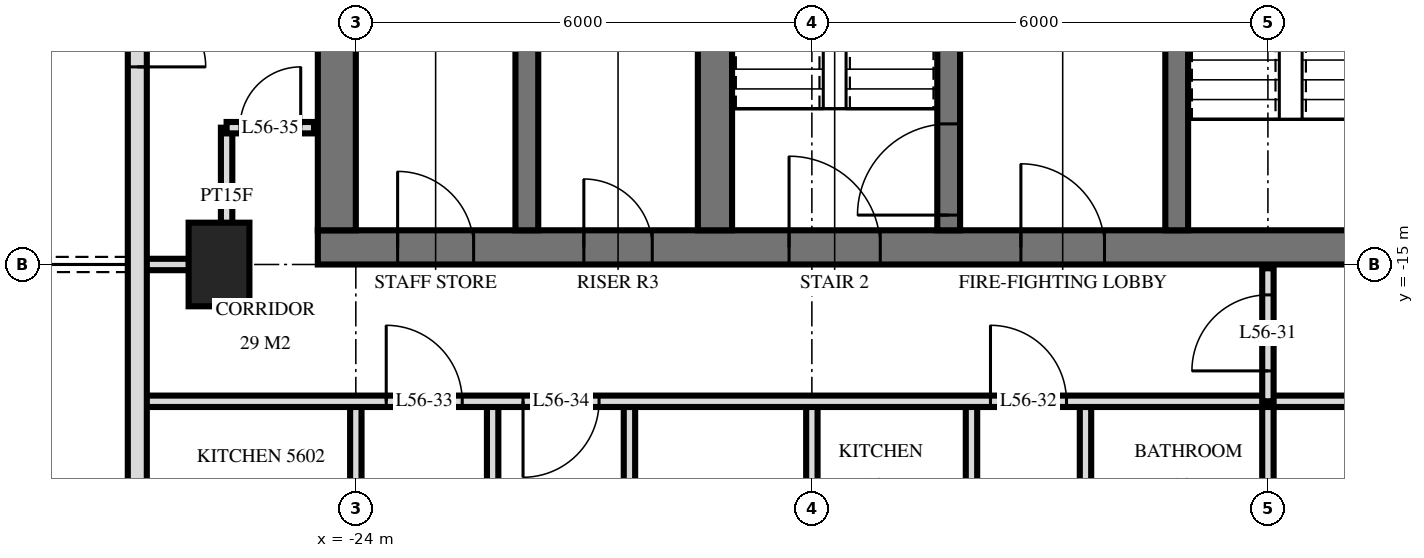
"""IFC4 building model, lengths in metres.
Left out: names, types, materials, properties, quantities, classifications, styles, units other than length and angle.
Written with IfcOpenShell. Run it as: python <this file> out.ifc"""

import sys

from ifc_helpers import new_model, si_unit, direction, frame, frame_2d, origin, origin_2d, place, context, subcontext, project, spatial, rectangle, extrude, element, fill, save


model = new_model("IFC4")
c1 = context("Model", 3, precision=1e-05, world=origin(), true_north=direction((0.0, 1.0)))
c2 = subcontext(c1, "Body", "Model", "MODEL_VIEW")
j1 = project(units=[si_unit("LENGTHUNIT", "METRE"), si_unit("PLANEANGLEUNIT", "RADIAN")], contexts=[c1])
p1 = place(None, origin())
s1 = spatial("IfcSite", under=j1, at=p1, CompositionType="ELEMENT")
p2 = place(p1, origin())
s2 = spatial("IfcBuilding", under=s1, at=p2, CompositionType="ELEMENT")
p3 = place(p2, frame((0.0, 0.0, 215.1)))
s3 = spatial("IfcBuildingStorey", under=s2, at=p3, CompositionType="ELEMENT", Elevation=215.1)
p4 = place(p3, frame((-25.8, -15.0, 0.0), z_axis=(0.0, 0.0, 1.0), x_axis=(0.0, 1.0, 0.0)))
e1 = element("IfcColumn", 1, at=p4, inside=s3, PredefinedType="COLUMN", context=c2, shape_type="SweptSolid", body=[
    extrude(rectangle(XDim=1.1, YDim=0.8, at=origin_2d()), origin(), (0.0, 0.0, 1.0), 3.5),
])
p5 = place(p3, frame((-24.5, -14.775, 0.0), z_axis=(0.0, 0.0, 1.0), x_axis=(1.0, 0.0, 0.0)))
e2 = element("IfcWall", 2, at=p5, inside=s3, PredefinedType="SHEAR", context=c2, shape_type="SweptSolid", body=[
    extrude(rectangle(XDim=14.5, YDim=0.45, at=frame_2d((7.25, 0.0))), origin(), (0.0, 0.0, 1.0), 3.5),
])
p6 = place(p5, frame((6.2, 0.0, 0.0)))
e3 = element("IfcOpeningElement", 3, at=p6, cuts=e2, PredefinedType="OPENING", context=c2, shape_type="SweptSolid", body=[
    extrude(rectangle(XDim=1.2, YDim=2.1, at=frame_2d((0.6, 1.05))), frame((0.0, 0.235, 0.0), z_axis=(0.0, -1.0, 0.0), x_axis=(1.0, 0.0, 0.0)), (0.0, 0.0, 1.0), 0.47),
])
p7 = place(p5, frame((9.25, 0.0, 0.0)))
e4 = element("IfcOpeningElement", 4, at=p7, cuts=e2, PredefinedType="OPENING", context=c2, shape_type="SweptSolid", body=[
    extrude(rectangle(XDim=1.1, YDim=2.1, at=frame_2d((0.55, 1.05))), frame((0.0, 0.235, 0.0), z_axis=(0.0, -1.0, 0.0), x_axis=(1.0, 0.0, 0.0)), (0.0, 0.0, 1.0), 0.47),
])
p8 = place(p5, frame((3.5, 0.0, 0.0)))
e5 = element("IfcOpeningElement", 5, at=p8, cuts=e2, PredefinedType="OPENING", context=c2, shape_type="SweptSolid", body=[
    extrude(rectangle(XDim=0.9, YDim=2.1, at=frame_2d((0.45, 1.05))), frame((0.0, 0.235, 0.0), z_axis=(0.0, -1.0, 0.0), x_axis=(1.0, 0.0, 0.0)), (0.0, 0.0, 1.0), 0.47),
])
p9 = place(p5, frame((1.05, 0.0, 0.0)))
e6 = element("IfcOpeningElement", 6, at=p9, cuts=e2, PredefinedType="OPENING", context=c2, shape_type="SweptSolid", body=[
    extrude(rectangle(XDim=1.0, YDim=2.1, at=frame_2d((0.5, 1.05))), frame((0.0, 0.235, 0.0), z_axis=(0.0, -1.0, 0.0), x_axis=(1.0, 0.0, 0.0)), (0.0, 0.0, 1.0), 0.47),
])
p10 = place(p3, frame((-24.25, -14.55, 0.0), z_axis=(0.0, 0.0, 1.0), x_axis=(0.0, 1.0, 0.0)))
e7 = element("IfcWall", 7, at=p10, inside=s3, PredefinedType="SHEAR", context=c2, shape_type="SweptSolid", body=[
    extrude(rectangle(XDim=14.1, YDim=0.5, at=frame_2d((7.05, 0.0))), origin(), (0.0, 0.0, 1.0), 3.5),
])
p11 = place(p3, frame((-13.2, -14.55, 0.0), z_axis=(0.0, 0.0, 1.0), x_axis=(0.0, 1.0, 0.0)))
e8 = element("IfcWall", 8, at=p11, inside=s3, PredefinedType="SHEAR", context=c2, shape_type="SweptSolid", body=[
    extrude(rectangle(XDim=5.4, YDim=0.3, at=frame_2d((2.7, 0.0))), origin(), (0.0, 0.0, 1.0), 3.5),
])
p12 = place(p11, frame((4.0, 0.0, 0.0)))
e9 = element("IfcOpeningElement", 9, at=p12, cuts=e8, PredefinedType="OPENING", context=c2, shape_type="SweptSolid", body=[
    extrude(rectangle(XDim=1.2, YDim=2.1, at=frame_2d((0.6, 1.05))), frame((0.0, 0.16, 0.0), z_axis=(0.0, -1.0, 0.0), x_axis=(1.0, 0.0, 0.0)), (0.0, 0.0, 1.0), 0.32),
])
p13 = place(p3, frame((-16.2, -14.55, 0.0), z_axis=(0.0, 0.0, 1.0), x_axis=(0.0, 1.0, 0.0)))
e10 = element("IfcWall", 10, at=p13, inside=s3, PredefinedType="SHEAR", context=c2, shape_type="SweptSolid", body=[
    extrude(rectangle(XDim=5.4, YDim=0.3, at=frame_2d((2.7, 0.0))), origin(), (0.0, 0.0, 1.0), 3.5),
])
p14 = place(p13, frame((0.2, 0.0, 0.0)))
e11 = element("IfcOpeningElement", 11, at=p14, cuts=e10, PredefinedType="OPENING", context=c2, shape_type="SweptSolid", body=[
    extrude(rectangle(XDim=1.2, YDim=2.1, at=frame_2d((0.6, 1.05))), frame((0.0, 0.16, 0.0), z_axis=(0.0, -1.0, 0.0), x_axis=(1.0, 0.0, 0.0)), (0.0, 0.0, 1.0), 0.32),
])
p15 = place(p3, frame((-19.275, -14.55, 0.0), z_axis=(0.0, 0.0, 1.0), x_axis=(0.0, 1.0, 0.0)))
e12 = element("IfcWall", 12, at=p15, inside=s3, PredefinedType="SHEAR", context=c2, shape_type="SweptSolid", body=[
    extrude(rectangle(XDim=5.4, YDim=0.45, at=frame_2d((2.7, 0.0))), origin(), (0.0, 0.0, 1.0), 3.5),
])
p16 = place(p3, frame((-21.75, -14.55, 0.0), z_axis=(0.0, 0.0, 1.0), x_axis=(0.0, 1.0, 0.0)))
e13 = element("IfcWall", 13, at=p16, inside=s3, PredefinedType="SHEAR", context=c2, shape_type="SweptSolid", body=[
    extrude(rectangle(XDim=5.4, YDim=0.3, at=frame_2d((2.7, 0.0))), origin(), (0.0, 0.0, 1.0), 3.5),
])
p17 = place(p3, frame((-26.875, -3.325, 0.0), z_axis=(0.0, 0.0, 1.0), x_axis=(0.0, -1.0, 0.0)))
e14 = element("IfcWall", 14, at=p17, inside=s3, PredefinedType="SOLIDWALL", context=c2, shape_type="SweptSolid", body=[
    extrude(rectangle(XDim=21.551, YDim=0.25, at=frame_2d((10.775, 0.0))), origin(), (0.0, 0.0, 1.0), 3.22),
])
p18 = place(p17, frame((7.275, 0.0, 0.0)))
e15 = element("IfcOpeningElement", 15, at=p18, cuts=e14, PredefinedType="OPENING", context=c2, shape_type="SweptSolid", body=[
    extrude(rectangle(XDim=1.8, YDim=2.4, at=frame_2d((0.9, 1.2))), frame((0.0, 0.135, 0.0), z_axis=(0.0, -1.0, 0.0), x_axis=(1.0, 0.0, 0.0)), (0.0, 0.0, 1.0), 0.27),
])
p19 = place(p17, frame((15.275, 0.0, 0.0)))
e16 = element("IfcOpeningElement", 16, at=p19, cuts=e14, PredefinedType="OPENING", context=c2, shape_type="SweptSolid", body=[
    extrude(rectangle(XDim=1.8, YDim=2.4, at=frame_2d((0.9, 1.2))), frame((0.0, 0.135, 0.0), z_axis=(0.0, -1.0, 0.0), x_axis=(1.0, 0.0, 0.0)), (0.0, 0.0, 1.0), 0.27),
])
p20 = place(p17, frame((18.875, 0.0, 0.0)))
e17 = element("IfcOpeningElement", 17, at=p20, cuts=e14, PredefinedType="OPENING", context=c2, shape_type="SweptSolid", body=[
    extrude(rectangle(XDim=1.8, YDim=2.4, at=frame_2d((0.9, 1.2))), frame((0.0, 0.135, 0.0), z_axis=(0.0, -1.0, 0.0), x_axis=(1.0, 0.0, 0.0)), (0.0, 0.0, 1.0), 0.27),
])
p21 = place(p3, frame((-12.0, -16.8, 0.0), z_axis=(0.0, 0.0, 1.0), x_axis=(0.0, 1.0, 0.0)))
e18 = element("IfcWall", 18, at=p21, inside=s3, PredefinedType="PARTITIONING", context=c2, shape_type="SweptSolid", body=[
    extrude(rectangle(XDim=1.75, YDim=0.15, at=frame_2d((0.875, 0.0))), origin(), (0.0, 0.0, 1.0), 3.22),
])
p22 = place(p21, frame((0.4, 0.0, 0.0)))
e19 = element("IfcOpeningElement", 19, at=p22, cuts=e18, PredefinedType="OPENING", context=c2, shape_type="SweptSolid", body=[
    extrude(rectangle(XDim=1.0, YDim=2.1, at=frame_2d((0.5, 1.05))), frame((0.0, 0.085, 0.0), z_axis=(0.0, -1.0, 0.0), x_axis=(1.0, 0.0, 0.0)), (0.0, 0.0, 1.0), 0.17),
])
p23 = place(p3, frame((-12.0, -29.22, 0.0), z_axis=(0.0, 0.0, 1.0), x_axis=(0.0, 1.0, 0.0)))
e20 = element("IfcWall", 20, at=p23, inside=s3, PredefinedType="PARTITIONING", context=c2, shape_type="SweptSolid", body=[
    extrude(rectangle(XDim=12.42, YDim=0.15, at=frame_2d((6.21, 0.0))), origin(), (0.0, 0.0, 1.0), 3.22),
])
p24 = place(p3, frame((-14.4, -21.0, 0.0), z_axis=(0.0, 0.0, 1.0), x_axis=(0.0, 1.0, 0.0)))
e21 = element("IfcWall", 21, at=p24, inside=s3, PredefinedType="PARTITIONING", context=c2, shape_type="SweptSolid", body=[
    extrude(rectangle(XDim=4.2, YDim=0.15, at=frame_2d((2.1, 0.0))), origin(), (0.0, 0.0, 1.0), 3.22),
])
p25 = place(p24, frame((1.6, 0.0, 0.0)))
e22 = element("IfcOpeningElement", 22, at=p25, cuts=e21, PredefinedType="OPENING", context=c2, shape_type="SweptSolid", body=[
    extrude(rectangle(XDim=1.0, YDim=2.1, at=frame_2d((0.5, 1.05))), frame((0.0, 0.085, 0.0), z_axis=(0.0, -1.0, 0.0), x_axis=(1.0, 0.0, 0.0)), (0.0, 0.0, 1.0), 0.17),
])
p26 = place(p3, frame((-15.9, -21.0, 0.0), z_axis=(0.0, 0.0, 1.0), x_axis=(0.0, 1.0, 0.0)))
e23 = element("IfcWall", 23, at=p26, inside=s3, PredefinedType="PARTITIONING", context=c2, shape_type="SweptSolid", body=[
    extrude(rectangle(XDim=4.2, YDim=0.15, at=frame_2d((2.1, 0.0))), origin(), (0.0, 0.0, 1.0), 3.22),
])
p27 = place(p26, frame((1.6, 0.0, 0.0)))
e24 = element("IfcOpeningElement", 24, at=p27, cuts=e23, PredefinedType="OPENING", context=c2, shape_type="SweptSolid", body=[
    extrude(rectangle(XDim=1.0, YDim=2.1, at=frame_2d((0.5, 1.05))), frame((0.0, 0.085, 0.0), z_axis=(0.0, -1.0, 0.0), x_axis=(1.0, 0.0, 0.0)), (0.0, 0.0, 1.0), 0.17),
])
p28 = place(p3, frame((-18.0, -29.22, 0.0), z_axis=(0.0, 0.0, 1.0), x_axis=(0.0, 1.0, 0.0)))
e25 = element("IfcWall", 25, at=p28, inside=s3, PredefinedType="PARTITIONING", context=c2, shape_type="SweptSolid", body=[
    extrude(rectangle(XDim=12.42, YDim=0.15, at=frame_2d((6.21, 0.0))), origin(), (0.0, 0.0, 1.0), 3.22),
])
for number, where, z_axis, x_axis in (
    (26, (-20.4, -21.0, 0.0), (0.0, 0.0, 1.0), (0.0, 1.0, 0.0)),
    (27, (-22.2, -21.0, 0.0), (0.0, 0.0, 1.0), (0.0, 1.0, 0.0)),
):
    element("IfcWall", number, at=place(p3, frame(where, z_axis=z_axis, x_axis=x_axis)), inside=s3, PredefinedType="PARTITIONING", context=c2, shape_type="SweptSolid", body=[
        extrude(rectangle(XDim=4.2, YDim=0.15, at=frame_2d((2.1, 0.0))), origin(), (0.0, 0.0, 1.0), 3.22),
    ])
p29 = place(p3, frame((-24.0, -21.0, 0.0), z_axis=(0.0, 0.0, 1.0), x_axis=(0.0, 1.0, 0.0)))
e28 = element("IfcWall", 28, at=p29, inside=s3, PredefinedType="PARTITIONING", context=c2, shape_type="SweptSolid", body=[
    extrude(rectangle(XDim=4.2, YDim=0.15, at=frame_2d((2.1, 0.0))), origin(), (0.0, 0.0, 1.0), 3.22),
])
p30 = place(p29, frame((1.58, 0.0, 0.0)))
e29 = element("IfcOpeningElement", 29, at=p30, cuts=e28, PredefinedType="OPENING", context=c2, shape_type="SweptSolid", body=[
    extrude(rectangle(XDim=1.0, YDim=2.1, at=frame_2d((0.5, 1.05))), frame((0.0, 0.085, 0.0), z_axis=(0.0, -1.0, 0.0), x_axis=(1.0, 0.0, 0.0)), (0.0, 0.0, 1.0), 0.17),
])
p31 = place(p3, frame((-25.7, -15.0, 0.0), z_axis=(0.0, 0.0, 1.0), x_axis=(0.0, 1.0, 0.0)))
e30 = element("IfcWall", 30, at=p31, inside=s3, PredefinedType="PARTITIONING", context=c2, shape_type="SweptSolid", body=[
    extrude(rectangle(XDim=1.8, YDim=0.15, at=frame_2d((0.9, 0.0))), origin(), (0.0, 0.0, 1.0), 3.22),
])
p32 = place(p3, frame((-26.82, -16.8, 0.0), z_axis=(0.0, 0.0, 1.0), x_axis=(1.0, 0.0, 0.0)))
e31 = element("IfcWall", 31, at=p32, inside=s3, PredefinedType="PARTITIONING", context=c2, shape_type="SweptSolid", body=[
    extrude(rectangle(XDim=53.64, YDim=0.15, at=frame_2d((26.82, 0.0))), origin(), (0.0, 0.0, 1.0), 3.22),
])
p33 = place(p32, frame((11.17, 0.0, 0.0)))
e32 = element("IfcOpeningElement", 32, at=p33, cuts=e31, PredefinedType="OPENING", context=c2, shape_type="SweptSolid", body=[
    extrude(rectangle(XDim=1.0, YDim=2.1, at=frame_2d((0.5, 1.05))), frame((0.0, 0.085, 0.0), z_axis=(0.0, -1.0, 0.0), x_axis=(1.0, 0.0, 0.0)), (0.0, 0.0, 1.0), 0.17),
])
p34 = place(p32, frame((3.22, 0.0, 0.0)))
e33 = element("IfcOpeningElement", 33, at=p34, cuts=e31, PredefinedType="OPENING", context=c2, shape_type="SweptSolid", body=[
    extrude(rectangle(XDim=1.0, YDim=2.1, at=frame_2d((0.5, 1.05))), frame((0.0, 0.085, 0.0), z_axis=(0.0, -1.0, 0.0), x_axis=(1.0, 0.0, 0.0)), (0.0, 0.0, 1.0), 0.17),
])
p35 = place(p32, frame((5.02, 0.0, 0.0)))
e34 = element("IfcOpeningElement", 34, at=p35, cuts=e31, PredefinedType="OPENING", context=c2, shape_type="SweptSolid", body=[
    extrude(rectangle(XDim=1.0, YDim=2.1, at=frame_2d((0.5, 1.05))), frame((0.0, 0.085, 0.0), z_axis=(0.0, -1.0, 0.0), x_axis=(1.0, 0.0, 0.0)), (0.0, 0.0, 1.0), 0.17),
])
p36 = place(p32, frame((47.72, 0.0, 0.0)))
e35 = element("IfcOpeningElement", 35, at=p36, cuts=e31, PredefinedType="OPENING", context=c2, shape_type="SweptSolid", body=[
    extrude(rectangle(XDim=1.0, YDim=2.1, at=frame_2d((0.5, 1.05))), frame((0.0, 0.085, 0.0), z_axis=(0.0, -1.0, 0.0), x_axis=(1.0, 0.0, 0.0)), (0.0, 0.0, 1.0), 0.17),
])
p37 = place(p32, frame((51.04, 0.0, 0.0)))
e36 = element("IfcOpeningElement", 36, at=p37, cuts=e31, PredefinedType="OPENING", context=c2, shape_type="SweptSolid", body=[
    extrude(rectangle(XDim=1.0, YDim=2.1, at=frame_2d((0.5, 1.05))), frame((0.0, 0.085, 0.0), z_axis=(0.0, -1.0, 0.0), x_axis=(1.0, 0.0, 0.0)), (0.0, 0.0, 1.0), 0.17),
])
p38 = place(p32, frame((17.32, 0.0, 0.0)))
e37 = element("IfcOpeningElement", 37, at=p38, cuts=e31, PredefinedType="OPENING", context=c2, shape_type="SweptSolid", body=[
    extrude(rectangle(XDim=1.0, YDim=2.1, at=frame_2d((0.5, 1.05))), frame((0.0, 0.085, 0.0), z_axis=(0.0, -1.0, 0.0), x_axis=(1.0, 0.0, 0.0)), (0.0, 0.0, 1.0), 0.17),
])
p39 = place(p32, frame((26.32, 0.0, 0.0)))
e38 = element("IfcOpeningElement", 38, at=p39, cuts=e31, PredefinedType="OPENING", context=c2, shape_type="SweptSolid", body=[
    extrude(rectangle(XDim=1.0, YDim=2.1, at=frame_2d((0.5, 1.05))), frame((0.0, 0.085, 0.0), z_axis=(0.0, -1.0, 0.0), x_axis=(1.0, 0.0, 0.0)), (0.0, 0.0, 1.0), 0.17),
])
p40 = place(p32, frame((35.32, 0.0, 0.0)))
e39 = element("IfcOpeningElement", 39, at=p40, cuts=e31, PredefinedType="OPENING", context=c2, shape_type="SweptSolid", body=[
    extrude(rectangle(XDim=1.0, YDim=2.1, at=frame_2d((0.5, 1.05))), frame((0.0, 0.085, 0.0), z_axis=(0.0, -1.0, 0.0), x_axis=(1.0, 0.0, 0.0)), (0.0, 0.0, 1.0), 0.17),
])
p41 = place(p3, frame((-26.82, -15.0, 0.0), z_axis=(0.0, 0.0, 1.0), x_axis=(1.0, 0.0, 0.0)))
e40 = element("IfcWall", 40, at=p41, inside=s3, PredefinedType="PARTITIONING", context=c2, shape_type="SweptSolid", body=[
    extrude(rectangle(XDim=1.12, YDim=0.15, at=frame_2d((0.56, 0.0))), origin(), (0.0, 0.0, 1.0), 3.22),
])
p42 = place(p3, frame((-25.7, -13.2, 0.0), z_axis=(0.0, 0.0, 1.0), x_axis=(1.0, 0.0, 0.0)))
e41 = element("IfcWall", 41, at=p42, inside=s3, PredefinedType="PARTITIONING", context=c2, shape_type="SweptSolid", body=[
    extrude(rectangle(XDim=1.15, YDim=0.15, at=frame_2d((0.575, 0.0))), origin(), (0.0, 0.0, 1.0), 3.22),
])
p43 = place(p42, frame((0.175, 0.0, 0.0)))
e42 = element("IfcOpeningElement", 42, at=p43, cuts=e41, PredefinedType="OPENING", context=c2, shape_type="SweptSolid", body=[
    extrude(rectangle(XDim=0.8, YDim=2.1, at=frame_2d((0.4, 1.05))), frame((0.0, 0.085, 0.0), z_axis=(0.0, -1.0, 0.0), x_axis=(1.0, 0.0, 0.0)), (0.0, 0.0, 1.0), 0.17),
])
p44 = place(p18, origin())
e43 = element("IfcDoor", 43, at=p44, inside=s3, OperationType="DOUBLE_DOOR_SINGLE_SWING", PredefinedType="DOOR", context=c2, shape_type="SweptSolid", body=[
    extrude(rectangle(XDim=1.8, YDim=2.4, at=frame_2d((0.9, 1.2))), frame((0.0, 0.025, 0.0), z_axis=(0.0, -1.0, 0.0), x_axis=(1.0, 0.0, 0.0)), (0.0, 0.0, 1.0), 0.05),
])
fill(e15, e43)
p45 = place(p6, origin())
e44 = element("IfcDoor", 44, at=p45, inside=s3, OperationType="SINGLE_SWING_RIGHT", PredefinedType="DOOR", context=c2, shape_type="SweptSolid", body=[
    extrude(rectangle(XDim=1.2, YDim=2.1, at=frame_2d((0.6, 1.05))), frame((0.0, 0.025, 0.0), z_axis=(0.0, -1.0, 0.0), x_axis=(1.0, 0.0, 0.0)), (0.0, 0.0, 1.0), 0.05),
])
fill(e3, e44)
p46 = place(p7, origin())
e45 = element("IfcDoor", 45, at=p46, inside=s3, OperationType="SINGLE_SWING_RIGHT", PredefinedType="DOOR", context=c2, shape_type="SweptSolid", body=[
    extrude(rectangle(XDim=1.1, YDim=2.1, at=frame_2d((0.55, 1.05))), frame((0.0, 0.025, 0.0), z_axis=(0.0, -1.0, 0.0), x_axis=(1.0, 0.0, 0.0)), (0.0, 0.0, 1.0), 0.05),
])
fill(e4, e45)
p47 = place(p8, origin())
e46 = element("IfcDoor", 46, at=p47, inside=s3, OperationType="SINGLE_SWING_RIGHT", PredefinedType="DOOR", context=c2, shape_type="SweptSolid", body=[
    extrude(rectangle(XDim=0.9, YDim=2.1, at=frame_2d((0.45, 1.05))), frame((0.0, 0.025, 0.0), z_axis=(0.0, -1.0, 0.0), x_axis=(1.0, 0.0, 0.0)), (0.0, 0.0, 1.0), 0.05),
])
fill(e5, e46)
p48 = place(p9, origin())
e47 = element("IfcDoor", 47, at=p48, inside=s3, OperationType="SINGLE_SWING_RIGHT", PredefinedType="DOOR", context=c2, shape_type="SweptSolid", body=[
    extrude(rectangle(XDim=1.0, YDim=2.1, at=frame_2d((0.5, 1.05))), frame((0.0, 0.025, 0.0), z_axis=(0.0, -1.0, 0.0), x_axis=(1.0, 0.0, 0.0)), (0.0, 0.0, 1.0), 0.05),
])
fill(e6, e47)
p49 = place(p14, origin())
e48 = element("IfcDoor", 48, at=p49, inside=s3, OperationType="SINGLE_SWING_RIGHT", PredefinedType="DOOR", context=c2, shape_type="SweptSolid", body=[
    extrude(rectangle(XDim=1.2, YDim=2.1, at=frame_2d((0.6, 1.05))), frame((0.0, 0.025, 0.0), z_axis=(0.0, -1.0, 0.0), x_axis=(1.0, 0.0, 0.0)), (0.0, 0.0, 1.0), 0.05),
])
fill(e11, e48)
p50 = place(p22, origin())
e49 = element("IfcDoor", 49, at=p50, inside=s3, OperationType="SINGLE_SWING_RIGHT", PredefinedType="DOOR", context=c2, shape_type="SweptSolid", body=[
    extrude(rectangle(XDim=1.0, YDim=2.1, at=frame_2d((0.5, 1.05))), frame((0.0, 0.025, 0.0), z_axis=(0.0, -1.0, 0.0), x_axis=(1.0, 0.0, 0.0)), (0.0, 0.0, 1.0), 0.05),
])
fill(e19, e49)
p51 = place(p33, origin())
e50 = element("IfcDoor", 50, at=p51, inside=s3, OperationType="SINGLE_SWING_RIGHT", PredefinedType="DOOR", context=c2, shape_type="SweptSolid", body=[
    extrude(rectangle(XDim=1.0, YDim=2.1, at=frame_2d((0.5, 1.05))), frame((0.0, 0.025, 0.0), z_axis=(0.0, -1.0, 0.0), x_axis=(1.0, 0.0, 0.0)), (0.0, 0.0, 1.0), 0.05),
])
fill(e32, e50)
p52 = place(p34, origin())
e51 = element("IfcDoor", 51, at=p52, inside=s3, OperationType="SINGLE_SWING_RIGHT", PredefinedType="DOOR", context=c2, shape_type="SweptSolid", body=[
    extrude(rectangle(XDim=1.0, YDim=2.1, at=frame_2d((0.5, 1.05))), frame((0.0, 0.025, 0.0), z_axis=(0.0, -1.0, 0.0), x_axis=(1.0, 0.0, 0.0)), (0.0, 0.0, 1.0), 0.05),
])
fill(e33, e51)
p53 = place(p35, frame((0.5, 0.0, 0.0), z_axis=(0.0, 0.0, 1.0), x_axis=(-1.0, 0.0, 0.0)))
e52 = element("IfcDoor", 52, at=p53, inside=s3, OperationType="SINGLE_SWING_LEFT", PredefinedType="DOOR", context=c2, shape_type="SweptSolid", body=[
    extrude(rectangle(XDim=1.0, YDim=2.1, at=frame_2d((0.0, 1.05))), frame((0.0, -0.025, 0.0), z_axis=(0.0, 1.0, 0.0), x_axis=(-1.0, 0.0, 0.0)), (0.0, 0.0, 1.0), 0.05),
])
fill(e34, e52)
p54 = place(p43, origin())
e53 = element("IfcDoor", 53, at=p54, inside=s3, OperationType="SINGLE_SWING_LEFT", PredefinedType="DOOR", context=c2, shape_type="SweptSolid", body=[
    extrude(rectangle(XDim=0.8, YDim=2.1, at=frame_2d((0.4, 1.05))), frame((0.0, 0.025, 0.0), z_axis=(0.0, -1.0, 0.0), x_axis=(1.0, 0.0, 0.0)), (0.0, 0.0, 1.0), 0.05),
])
fill(e42, e53)
save(model, sys.argv[1])
